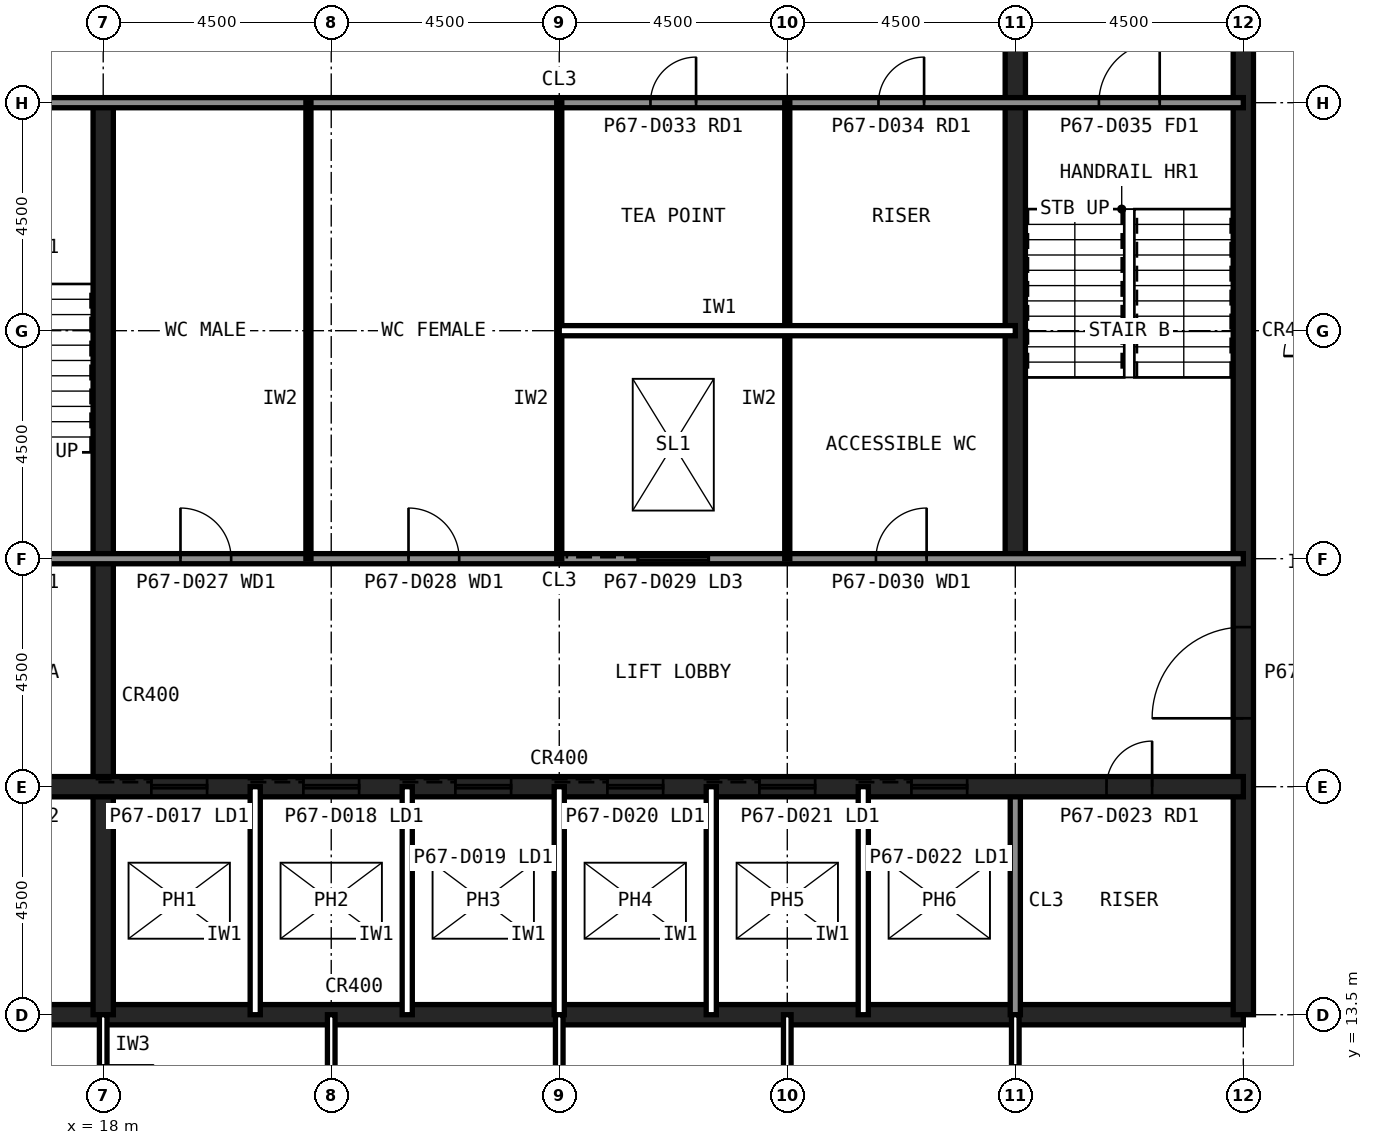
"""IFC4 building model, lengths in metres.
Left out: names, types, materials, properties, quantities, classifications, styles, units other than length and angle.
Written with IfcOpenShell. Run it as: python <this file> out.ifc"""

import sys

from ifc_helpers import new_model, si_unit, direction, frame, frame_2d, origin, place, context, subcontext, project, spatial, rectangle, extrude, element, fill, save


model = new_model("IFC4")
c1 = context("Model", 3, precision=1e-05, world=origin(), true_north=direction((0.0, 1.0)))
c2 = subcontext(c1, "Body", "Model", "MODEL_VIEW")
j1 = project(units=[si_unit("LENGTHUNIT", "METRE"), si_unit("PLANEANGLEUNIT", "RADIAN")], contexts=[c1])
p1 = place(None, origin())
s1 = spatial("IfcSite", under=j1, at=p1, CompositionType="ELEMENT")
p2 = place(p1, origin())
s2 = spatial("IfcBuilding", under=s1, at=p2, CompositionType="ELEMENT")
p3 = place(p2, frame((0.0, 0.0, 278.6)))
s3 = spatial("IfcBuildingStorey", under=s2, at=p3, CompositionType="ELEMENT", Elevation=278.6)
p4 = place(p3, frame((13.5, 13.5, 0.0), z_axis=(0.0, 0.0, 1.0), x_axis=(1.0, 0.0, 0.0)))
e1 = element("IfcWall", 1, at=p4, inside=s3, PredefinedType="SHEAR", context=c2, shape_type="SweptSolid", body=[
    extrude(rectangle(XDim=27.0, YDim=0.4, at=frame_2d((13.5, 0.0))), origin(), (0.0, 0.0, 1.0), 4.0),
])
p5 = place(p3, frame((40.5, 13.5, 0.0), z_axis=(0.0, 0.0, 1.0), x_axis=(0.0, 1.0, 0.0)))
e2 = element("IfcWall", 2, at=p5, inside=s3, PredefinedType="SHEAR", context=c2, shape_type="SweptSolid", body=[
    extrude(rectangle(XDim=27.0, YDim=0.4, at=frame_2d((13.5, 0.0))), origin(), (0.0, 0.0, 1.0), 4.0),
])
p6 = place(p5, frame((5.85, 0.0, 0.0)))
e3 = element("IfcOpeningElement", 3, at=p6, cuts=e2, PredefinedType="OPENING", context=c2, shape_type="SweptSolid", body=[
    extrude(rectangle(XDim=1.8, YDim=2.1, at=frame_2d((0.9, 1.05))), frame((0.0, 0.21, 0.0), z_axis=(0.0, -1.0, 0.0), x_axis=(1.0, 0.0, 0.0)), (0.0, 0.0, 1.0), 0.42),
])
p7 = place(p5, frame((19.65, 0.0, 0.0)))
e4 = element("IfcOpeningElement", 4, at=p7, cuts=e2, PredefinedType="OPENING", context=c2, shape_type="SweptSolid", body=[
    extrude(rectangle(XDim=1.2, YDim=2.1, at=frame_2d((0.6, 1.05))), frame((0.0, 0.21, 0.0), z_axis=(0.0, -1.0, 0.0), x_axis=(1.0, 0.0, 0.0)), (0.0, 0.0, 1.0), 0.42),
])
p8 = place(p3, frame((18.0, 13.5, 0.0), z_axis=(0.0, 0.0, 1.0), x_axis=(0.0, 1.0, 0.0)))
e5 = element("IfcWall", 5, at=p8, inside=s3, PredefinedType="SHEAR", context=c2, shape_type="SweptSolid", body=[
    extrude(rectangle(XDim=18.0, YDim=0.4, at=frame_2d((9.0, 0.0))), origin(), (0.0, 0.0, 1.0), 4.0),
])
p9 = place(p3, frame((36.0, 13.5, 0.0), z_axis=(0.0, 0.0, 1.0), x_axis=(0.0, 1.0, 0.0)))
e6 = element("IfcWall", 6, at=p9, inside=s3, PredefinedType="SOLIDWALL", context=c2, shape_type="SweptSolid", body=[
    extrude(rectangle(XDim=4.5, YDim=0.2, at=frame_2d((2.25, 0.0))), origin(), (0.0, 0.0, 1.0), 3.84),
])
p10 = place(p3, frame((36.0, 22.5, 0.0), z_axis=(0.0, 0.0, 1.0), x_axis=(0.0, 1.0, 0.0)))
e7 = element("IfcWall", 7, at=p10, inside=s3, PredefinedType="SHEAR", context=c2, shape_type="SweptSolid", body=[
    extrude(rectangle(XDim=18.0, YDim=0.4, at=frame_2d((9.0, 0.0))), origin(), (0.0, 0.0, 1.0), 4.0),
])
p11 = place(p3, frame((13.5, 18.0, 0.0), z_axis=(0.0, 0.0, 1.0), x_axis=(1.0, 0.0, 0.0)))
e8 = element("IfcWall", 8, at=p11, inside=s3, PredefinedType="SHEAR", context=c2, shape_type="SweptSolid", body=[
    extrude(rectangle(XDim=27.0, YDim=0.4, at=frame_2d((13.5, 0.0))), origin(), (0.0, 0.0, 1.0), 4.0),
])
p12 = place(p11, frame((24.3, 0.0, 0.0)))
e9 = element("IfcOpeningElement", 9, at=p12, cuts=e8, PredefinedType="OPENING", context=c2, shape_type="SweptSolid", body=[
    extrude(rectangle(XDim=0.9, YDim=2.1, at=frame_2d((0.45, 1.05))), frame((0.0, 0.21, 0.0), z_axis=(0.0, -1.0, 0.0), x_axis=(1.0, 0.0, 0.0)), (0.0, 0.0, 1.0), 0.42),
])
p13 = place(p11, frame((5.45, 0.0, 0.0)))
e10 = element("IfcOpeningElement", 10, at=p13, cuts=e8, PredefinedType="OPENING", context=c2, shape_type="SweptSolid", body=[
    extrude(rectangle(XDim=1.1, YDim=2.1, at=frame_2d((0.55, 1.05))), frame((0.0, 0.21, 0.0), z_axis=(0.0, -1.0, 0.0), x_axis=(1.0, 0.0, 0.0)), (0.0, 0.0, 1.0), 0.42),
])
p14 = place(p11, frame((8.45, 0.0, 0.0)))
e11 = element("IfcOpeningElement", 11, at=p14, cuts=e8, PredefinedType="OPENING", context=c2, shape_type="SweptSolid", body=[
    extrude(rectangle(XDim=1.1, YDim=2.1, at=frame_2d((0.55, 1.05))), frame((0.0, 0.21, 0.0), z_axis=(0.0, -1.0, 0.0), x_axis=(1.0, 0.0, 0.0)), (0.0, 0.0, 1.0), 0.42),
])
p15 = place(p11, frame((11.45, 0.0, 0.0)))
e12 = element("IfcOpeningElement", 12, at=p15, cuts=e8, PredefinedType="OPENING", context=c2, shape_type="SweptSolid", body=[
    extrude(rectangle(XDim=1.1, YDim=2.1, at=frame_2d((0.55, 1.05))), frame((0.0, 0.21, 0.0), z_axis=(0.0, -1.0, 0.0), x_axis=(1.0, 0.0, 0.0)), (0.0, 0.0, 1.0), 0.42),
])
p16 = place(p11, frame((14.45, 0.0, 0.0)))
e13 = element("IfcOpeningElement", 13, at=p16, cuts=e8, PredefinedType="OPENING", context=c2, shape_type="SweptSolid", body=[
    extrude(rectangle(XDim=1.1, YDim=2.1, at=frame_2d((0.55, 1.05))), frame((0.0, 0.21, 0.0), z_axis=(0.0, -1.0, 0.0), x_axis=(1.0, 0.0, 0.0)), (0.0, 0.0, 1.0), 0.42),
])
p17 = place(p11, frame((17.45, 0.0, 0.0)))
e14 = element("IfcOpeningElement", 14, at=p17, cuts=e8, PredefinedType="OPENING", context=c2, shape_type="SweptSolid", body=[
    extrude(rectangle(XDim=1.1, YDim=2.1, at=frame_2d((0.55, 1.05))), frame((0.0, 0.21, 0.0), z_axis=(0.0, -1.0, 0.0), x_axis=(1.0, 0.0, 0.0)), (0.0, 0.0, 1.0), 0.42),
])
p18 = place(p11, frame((20.45, 0.0, 0.0)))
e15 = element("IfcOpeningElement", 15, at=p18, cuts=e8, PredefinedType="OPENING", context=c2, shape_type="SweptSolid", body=[
    extrude(rectangle(XDim=1.1, YDim=2.1, at=frame_2d((0.55, 1.05))), frame((0.0, 0.21, 0.0), z_axis=(0.0, -1.0, 0.0), x_axis=(1.0, 0.0, 0.0)), (0.0, 0.0, 1.0), 0.42),
])
p19 = place(p11, frame((1.6, 0.0, 0.0)))
e16 = element("IfcOpeningElement", 16, at=p19, cuts=e8, PredefinedType="OPENING", context=c2, shape_type="SweptSolid", body=[
    extrude(rectangle(XDim=1.3, YDim=2.2, at=frame_2d((0.65, 1.1))), frame((0.0, 0.21, 0.0), z_axis=(0.0, -1.0, 0.0), x_axis=(1.0, 0.0, 0.0)), (0.0, 0.0, 1.0), 0.42),
])
p20 = place(p3, frame((13.5, 22.5, 0.0), z_axis=(0.0, 0.0, 1.0), x_axis=(1.0, 0.0, 0.0)))
e17 = element("IfcWall", 17, at=p20, inside=s3, PredefinedType="SOLIDWALL", context=c2, shape_type="SweptSolid", body=[
    extrude(rectangle(XDim=27.0, YDim=0.2, at=frame_2d((13.5, 0.0))), origin(), (0.0, 0.0, 1.0), 3.84),
])
p21 = place(p20, frame((1.65, 0.0, 0.0)))
e18 = element("IfcOpeningElement", 18, at=p21, cuts=e17, PredefinedType="OPENING", context=c2, shape_type="SweptSolid", body=[
    extrude(rectangle(XDim=1.2, YDim=2.1, at=frame_2d((0.6, 1.05))), frame((0.0, 0.11, 0.0), z_axis=(0.0, -1.0, 0.0), x_axis=(1.0, 0.0, 0.0)), (0.0, 0.0, 1.0), 0.22),
])
p22 = place(p20, frame((6.025, 0.0, 0.0)))
e19 = element("IfcOpeningElement", 19, at=p22, cuts=e17, PredefinedType="OPENING", context=c2, shape_type="SweptSolid", body=[
    extrude(rectangle(XDim=1.0, YDim=2.1, at=frame_2d((0.5, 1.05))), frame((0.0, 0.11, 0.0), z_axis=(0.0, -1.0, 0.0), x_axis=(1.0, 0.0, 0.0)), (0.0, 0.0, 1.0), 0.22),
])
p23 = place(p20, frame((10.525, 0.0, 0.0)))
e20 = element("IfcOpeningElement", 20, at=p23, cuts=e17, PredefinedType="OPENING", context=c2, shape_type="SweptSolid", body=[
    extrude(rectangle(XDim=1.0, YDim=2.1, at=frame_2d((0.5, 1.05))), frame((0.0, 0.11, 0.0), z_axis=(0.0, -1.0, 0.0), x_axis=(1.0, 0.0, 0.0)), (0.0, 0.0, 1.0), 0.22),
])
p24 = place(p20, frame((19.75, 0.0, 0.0)))
e21 = element("IfcOpeningElement", 21, at=p24, cuts=e17, PredefinedType="OPENING", context=c2, shape_type="SweptSolid", body=[
    extrude(rectangle(XDim=1.0, YDim=2.1, at=frame_2d((0.5, 1.05))), frame((0.0, 0.11, 0.0), z_axis=(0.0, -1.0, 0.0), x_axis=(1.0, 0.0, 0.0)), (0.0, 0.0, 1.0), 0.22),
])
p25 = place(p20, frame((15.05, 0.0, 0.0)))
e22 = element("IfcOpeningElement", 22, at=p25, cuts=e17, PredefinedType="OPENING", context=c2, shape_type="SweptSolid", body=[
    extrude(rectangle(XDim=1.4, YDim=2.4, at=frame_2d((0.7, 1.2))), frame((0.0, 0.11, 0.0), z_axis=(0.0, -1.0, 0.0), x_axis=(1.0, 0.0, 0.0)), (0.0, 0.0, 1.0), 0.22),
])
p26 = place(p3, frame((13.5, 31.5, 0.0), z_axis=(0.0, 0.0, 1.0), x_axis=(1.0, 0.0, 0.0)))
e23 = element("IfcWall", 23, at=p26, inside=s3, PredefinedType="SOLIDWALL", context=c2, shape_type="SweptSolid", body=[
    extrude(rectangle(XDim=27.0, YDim=0.2, at=frame_2d((13.5, 0.0))), origin(), (0.0, 0.0, 1.0), 3.84),
])
p27 = place(p26, frame((24.15, 0.0, 0.0)))
e24 = element("IfcOpeningElement", 24, at=p27, cuts=e23, PredefinedType="OPENING", context=c2, shape_type="SweptSolid", body=[
    extrude(rectangle(XDim=1.2, YDim=2.1, at=frame_2d((0.6, 1.05))), frame((0.0, 0.11, 0.0), z_axis=(0.0, -1.0, 0.0), x_axis=(1.0, 0.0, 0.0)), (0.0, 0.0, 1.0), 0.22),
])
p28 = place(p26, frame((15.3, 0.0, 0.0)))
e25 = element("IfcOpeningElement", 25, at=p28, cuts=e23, PredefinedType="OPENING", context=c2, shape_type="SweptSolid", body=[
    extrude(rectangle(XDim=0.9, YDim=2.1, at=frame_2d((0.45, 1.05))), frame((0.0, 0.11, 0.0), z_axis=(0.0, -1.0, 0.0), x_axis=(1.0, 0.0, 0.0)), (0.0, 0.0, 1.0), 0.22),
])
p29 = place(p26, frame((19.8, 0.0, 0.0)))
e26 = element("IfcOpeningElement", 26, at=p29, cuts=e23, PredefinedType="OPENING", context=c2, shape_type="SweptSolid", body=[
    extrude(rectangle(XDim=0.9, YDim=2.1, at=frame_2d((0.45, 1.05))), frame((0.0, 0.11, 0.0), z_axis=(0.0, -1.0, 0.0), x_axis=(1.0, 0.0, 0.0)), (0.0, 0.0, 1.0), 0.22),
])
for number, where, z_axis, x_axis in (
    (27, (21.0, 13.5, 0.0), (0.0, 0.0, 1.0), (0.0, 1.0, 0.0)),
    (28, (24.0, 13.5, 0.0), (0.0, 0.0, 1.0), (0.0, 1.0, 0.0)),
    (29, (27.0, 13.5, 0.0), (0.0, 0.0, 1.0), (0.0, 1.0, 0.0)),
    (30, (30.0, 13.5, 0.0), (0.0, 0.0, 1.0), (0.0, 1.0, 0.0)),
    (31, (33.0, 13.5, 0.0), (0.0, 0.0, 1.0), (0.0, 1.0, 0.0)),
):
    element("IfcWall", number, at=place(p3, frame(where, z_axis=z_axis, x_axis=x_axis)), inside=s3, PredefinedType="PARTITIONING", context=c2, shape_type="SweptSolid", body=[
        extrude(rectangle(XDim=4.5, YDim=0.2, at=frame_2d((2.25, 0.0))), origin(), (0.0, 0.0, 1.0), 3.84),
    ])
for number, where, z_axis, x_axis in (
    (32, (22.05, 22.5, 0.0), (0.0, 0.0, 1.0), (0.0, 1.0, 0.0)),
    (33, (27.0, 22.5, 0.0), (0.0, 0.0, 1.0), (0.0, 1.0, 0.0)),
    (34, (31.5, 22.5, 0.0), (0.0, 0.0, 1.0), (0.0, 1.0, 0.0)),
):
    element("IfcWall", number, at=place(p3, frame(where, z_axis=z_axis, x_axis=x_axis)), inside=s3, PredefinedType="PLUMBINGWALL", context=c2, shape_type="SweptSolid", body=[
        extrude(rectangle(XDim=9.0, YDim=0.1, at=frame_2d((4.5, 0.0))), origin(), (0.0, 0.0, 1.0), 3.84),
    ])
p30 = place(p3, frame((27.0, 27.0, 0.0), z_axis=(0.0, 0.0, 1.0), x_axis=(1.0, 0.0, 0.0)))
e35 = element("IfcWall", 35, at=p30, inside=s3, PredefinedType="PARTITIONING", context=c2, shape_type="SweptSolid", body=[
    extrude(rectangle(XDim=9.0, YDim=0.2, at=frame_2d((4.5, 0.0))), origin(), (0.0, 0.0, 1.0), 3.84),
])
p31 = place(p3, frame((22.5, 10.5, 0.0), z_axis=(0.0, 0.0, 1.0), x_axis=(0.0, 1.0, 0.0)))
e36 = element("IfcWall", 36, at=p31, inside=s3, PredefinedType="PARTITIONING", context=c2, shape_type="SweptSolid", body=[
    extrude(rectangle(XDim=3.0, YDim=0.15, at=frame_2d((1.5, 0.0))), origin(), (0.0, 0.0, 1.0), 2.989),
])
p32 = place(p3, frame((18.0, 13.5, 0.0), z_axis=(0.0, 0.0, 1.0), x_axis=(0.0, -1.0, 0.0)))
e37 = element("IfcWall", 37, at=p32, inside=s3, PredefinedType="PARTITIONING", context=c2, shape_type="SweptSolid", body=[
    extrude(rectangle(XDim=3.0, YDim=0.15, at=frame_2d((1.5, 0.0))), origin(), (0.0, 0.0, 1.0), 2.989),
])
p33 = place(p32, frame((1.0, 0.0, 0.0)))
e38 = element("IfcOpeningElement", 38, at=p33, cuts=e37, PredefinedType="OPENING", context=c2, shape_type="SweptSolid", body=[
    extrude(rectangle(XDim=1.0, YDim=2.1, at=frame_2d((0.5, 1.05))), frame((0.0, 0.085, 0.0), z_axis=(0.0, -1.0, 0.0), x_axis=(1.0, 0.0, 0.0)), (0.0, 0.0, 1.0), 0.17),
])
for number, where, z_axis, x_axis in (
    (39, (27.0, 10.5, 0.0), (0.0, 0.0, 1.0), (0.0, 1.0, 0.0)),
    (40, (31.5, 10.5, 0.0), (0.0, 0.0, 1.0), (0.0, 1.0, 0.0)),
):
    element("IfcWall", number, at=place(p3, frame(where, z_axis=z_axis, x_axis=x_axis)), inside=s3, PredefinedType="PARTITIONING", context=c2, shape_type="SweptSolid", body=[
        extrude(rectangle(XDim=3.0, YDim=0.15, at=frame_2d((1.5, 0.0))), origin(), (0.0, 0.0, 1.0), 2.989),
    ])
p34 = place(p3, frame((36.0, 10.5, 0.0), z_axis=(0.0, 0.0, 1.0), x_axis=(0.0, 1.0, 0.0)))
e41 = element("IfcWall", 41, at=p34, inside=s3, PredefinedType="PARTITIONING", context=c2, shape_type="SweptSolid", body=[
    extrude(rectangle(XDim=3.0, YDim=0.15, at=frame_2d((1.5, 0.0))), origin(), (0.0, 0.0, 1.0), 2.989),
])
p35 = place(p34, frame((1.0, 0.0, 0.0)))
e42 = element("IfcOpeningElement", 42, at=p35, cuts=e41, PredefinedType="OPENING", context=c2, shape_type="SweptSolid", body=[
    extrude(rectangle(XDim=1.0, YDim=2.1, at=frame_2d((0.5, 1.05))), frame((0.0, 0.085, 0.0), z_axis=(0.0, -1.0, 0.0), x_axis=(1.0, 0.0, 0.0)), (0.0, 0.0, 1.0), 0.17),
])
p36 = place(p6, origin())
e43 = element("IfcDoor", 43, at=p36, inside=s3, OperationType="SINGLE_SWING_LEFT", PredefinedType="DOOR", context=c2, shape_type="SweptSolid", body=[
    extrude(rectangle(XDim=1.8, YDim=2.1, at=frame_2d((0.9, 1.05))), frame((0.0, 0.025, 0.0), z_axis=(0.0, -1.0, 0.0), x_axis=(1.0, 0.0, 0.0)), (0.0, 0.0, 1.0), 0.05),
])
fill(e3, e43)
p37 = place(p27, origin())
e44 = element("IfcDoor", 44, at=p37, inside=s3, OperationType="SINGLE_SWING_RIGHT", PredefinedType="DOOR", context=c2, shape_type="SweptSolid", body=[
    extrude(rectangle(XDim=1.2, YDim=2.1, at=frame_2d((0.6, 1.05))), frame((0.0, 0.025, 0.0), z_axis=(0.0, -1.0, 0.0), x_axis=(1.0, 0.0, 0.0)), (0.0, 0.0, 1.0), 0.05),
])
fill(e24, e44)
p38 = place(p22, origin())
e45 = element("IfcDoor", 45, at=p38, inside=s3, OperationType="SINGLE_SWING_LEFT", PredefinedType="DOOR", context=c2, shape_type="SweptSolid", body=[
    extrude(rectangle(XDim=1.0, YDim=2.1, at=frame_2d((0.5, 1.05))), frame((0.0, 0.025, 0.0), z_axis=(0.0, -1.0, 0.0), x_axis=(1.0, 0.0, 0.0)), (0.0, 0.0, 1.0), 0.05),
])
fill(e19, e45)
p39 = place(p23, origin())
e46 = element("IfcDoor", 46, at=p39, inside=s3, OperationType="SINGLE_SWING_LEFT", PredefinedType="DOOR", context=c2, shape_type="SweptSolid", body=[
    extrude(rectangle(XDim=1.0, YDim=2.1, at=frame_2d((0.5, 1.05))), frame((0.0, 0.025, 0.0), z_axis=(0.0, -1.0, 0.0), x_axis=(1.0, 0.0, 0.0)), (0.0, 0.0, 1.0), 0.05),
])
fill(e20, e46)
p40 = place(p24, origin())
e47 = element("IfcDoor", 47, at=p40, inside=s3, OperationType="SINGLE_SWING_RIGHT", PredefinedType="DOOR", context=c2, shape_type="SweptSolid", body=[
    extrude(rectangle(XDim=1.0, YDim=2.1, at=frame_2d((0.5, 1.05))), frame((0.0, 0.025, 0.0), z_axis=(0.0, -1.0, 0.0), x_axis=(1.0, 0.0, 0.0)), (0.0, 0.0, 1.0), 0.05),
])
fill(e21, e47)
p41 = place(p28, origin())
e48 = element("IfcDoor", 48, at=p41, inside=s3, OperationType="SINGLE_SWING_RIGHT", PredefinedType="DOOR", context=c2, shape_type="SweptSolid", body=[
    extrude(rectangle(XDim=0.9, YDim=2.1, at=frame_2d((0.45, 1.05))), frame((0.0, 0.025, 0.0), z_axis=(0.0, -1.0, 0.0), x_axis=(1.0, 0.0, 0.0)), (0.0, 0.0, 1.0), 0.05),
])
fill(e25, e48)
p42 = place(p29, origin())
e49 = element("IfcDoor", 49, at=p42, inside=s3, OperationType="SINGLE_SWING_RIGHT", PredefinedType="DOOR", context=c2, shape_type="SweptSolid", body=[
    extrude(rectangle(XDim=0.9, YDim=2.1, at=frame_2d((0.45, 1.05))), frame((0.0, 0.025, 0.0), z_axis=(0.0, -1.0, 0.0), x_axis=(1.0, 0.0, 0.0)), (0.0, 0.0, 1.0), 0.05),
])
fill(e26, e49)
p43 = place(p12, origin())
e50 = element("IfcDoor", 50, at=p43, inside=s3, OperationType="SINGLE_SWING_RIGHT", PredefinedType="DOOR", context=c2, shape_type="SweptSolid", body=[
    extrude(rectangle(XDim=0.9, YDim=2.1, at=frame_2d((0.45, 1.05))), frame((0.0, 0.025, 0.0), z_axis=(0.0, -1.0, 0.0), x_axis=(1.0, 0.0, 0.0)), (0.0, 0.0, 1.0), 0.05),
])
fill(e9, e50)
p44 = place(p13, origin())
e51 = element("IfcDoor", 51, at=p44, inside=s3, OperationType="SLIDING_TO_LEFT", PredefinedType="DOOR", context=c2, shape_type="SweptSolid", body=[
    extrude(rectangle(XDim=1.1, YDim=2.1, at=frame_2d((0.55, 1.05))), frame((0.0, 0.025, 0.0), z_axis=(0.0, -1.0, 0.0), x_axis=(1.0, 0.0, 0.0)), (0.0, 0.0, 1.0), 0.05),
])
fill(e10, e51)
p45 = place(p14, origin())
e52 = element("IfcDoor", 52, at=p45, inside=s3, OperationType="SLIDING_TO_LEFT", PredefinedType="DOOR", context=c2, shape_type="SweptSolid", body=[
    extrude(rectangle(XDim=1.1, YDim=2.1, at=frame_2d((0.55, 1.05))), frame((0.0, 0.025, 0.0), z_axis=(0.0, -1.0, 0.0), x_axis=(1.0, 0.0, 0.0)), (0.0, 0.0, 1.0), 0.05),
])
fill(e11, e52)
p46 = place(p15, origin())
e53 = element("IfcDoor", 53, at=p46, inside=s3, OperationType="SLIDING_TO_LEFT", PredefinedType="DOOR", context=c2, shape_type="SweptSolid", body=[
    extrude(rectangle(XDim=1.1, YDim=2.1, at=frame_2d((0.55, 1.05))), frame((0.0, 0.025, 0.0), z_axis=(0.0, -1.0, 0.0), x_axis=(1.0, 0.0, 0.0)), (0.0, 0.0, 1.0), 0.05),
])
fill(e12, e53)
p47 = place(p16, origin())
e54 = element("IfcDoor", 54, at=p47, inside=s3, OperationType="SLIDING_TO_LEFT", PredefinedType="DOOR", context=c2, shape_type="SweptSolid", body=[
    extrude(rectangle(XDim=1.1, YDim=2.1, at=frame_2d((0.55, 1.05))), frame((0.0, 0.025, 0.0), z_axis=(0.0, -1.0, 0.0), x_axis=(1.0, 0.0, 0.0)), (0.0, 0.0, 1.0), 0.05),
])
fill(e13, e54)
p48 = place(p17, origin())
e55 = element("IfcDoor", 55, at=p48, inside=s3, OperationType="SLIDING_TO_LEFT", PredefinedType="DOOR", context=c2, shape_type="SweptSolid", body=[
    extrude(rectangle(XDim=1.1, YDim=2.1, at=frame_2d((0.55, 1.05))), frame((0.0, 0.025, 0.0), z_axis=(0.0, -1.0, 0.0), x_axis=(1.0, 0.0, 0.0)), (0.0, 0.0, 1.0), 0.05),
])
fill(e14, e55)
p49 = place(p18, origin())
e56 = element("IfcDoor", 56, at=p49, inside=s3, OperationType="SLIDING_TO_LEFT", PredefinedType="DOOR", context=c2, shape_type="SweptSolid", body=[
    extrude(rectangle(XDim=1.1, YDim=2.1, at=frame_2d((0.55, 1.05))), frame((0.0, 0.025, 0.0), z_axis=(0.0, -1.0, 0.0), x_axis=(1.0, 0.0, 0.0)), (0.0, 0.0, 1.0), 0.05),
])
fill(e15, e56)
p50 = place(p25, origin())
e57 = element("IfcDoor", 57, at=p50, inside=s3, OperationType="SLIDING_TO_LEFT", PredefinedType="DOOR", context=c2, shape_type="SweptSolid", body=[
    extrude(rectangle(XDim=1.4, YDim=2.4, at=frame_2d((0.7, 1.2))), frame((0.0, 0.025, 0.0), z_axis=(0.0, -1.0, 0.0), x_axis=(1.0, 0.0, 0.0)), (0.0, 0.0, 1.0), 0.05),
])
fill(e22, e57)
save(model, sys.argv[1])
